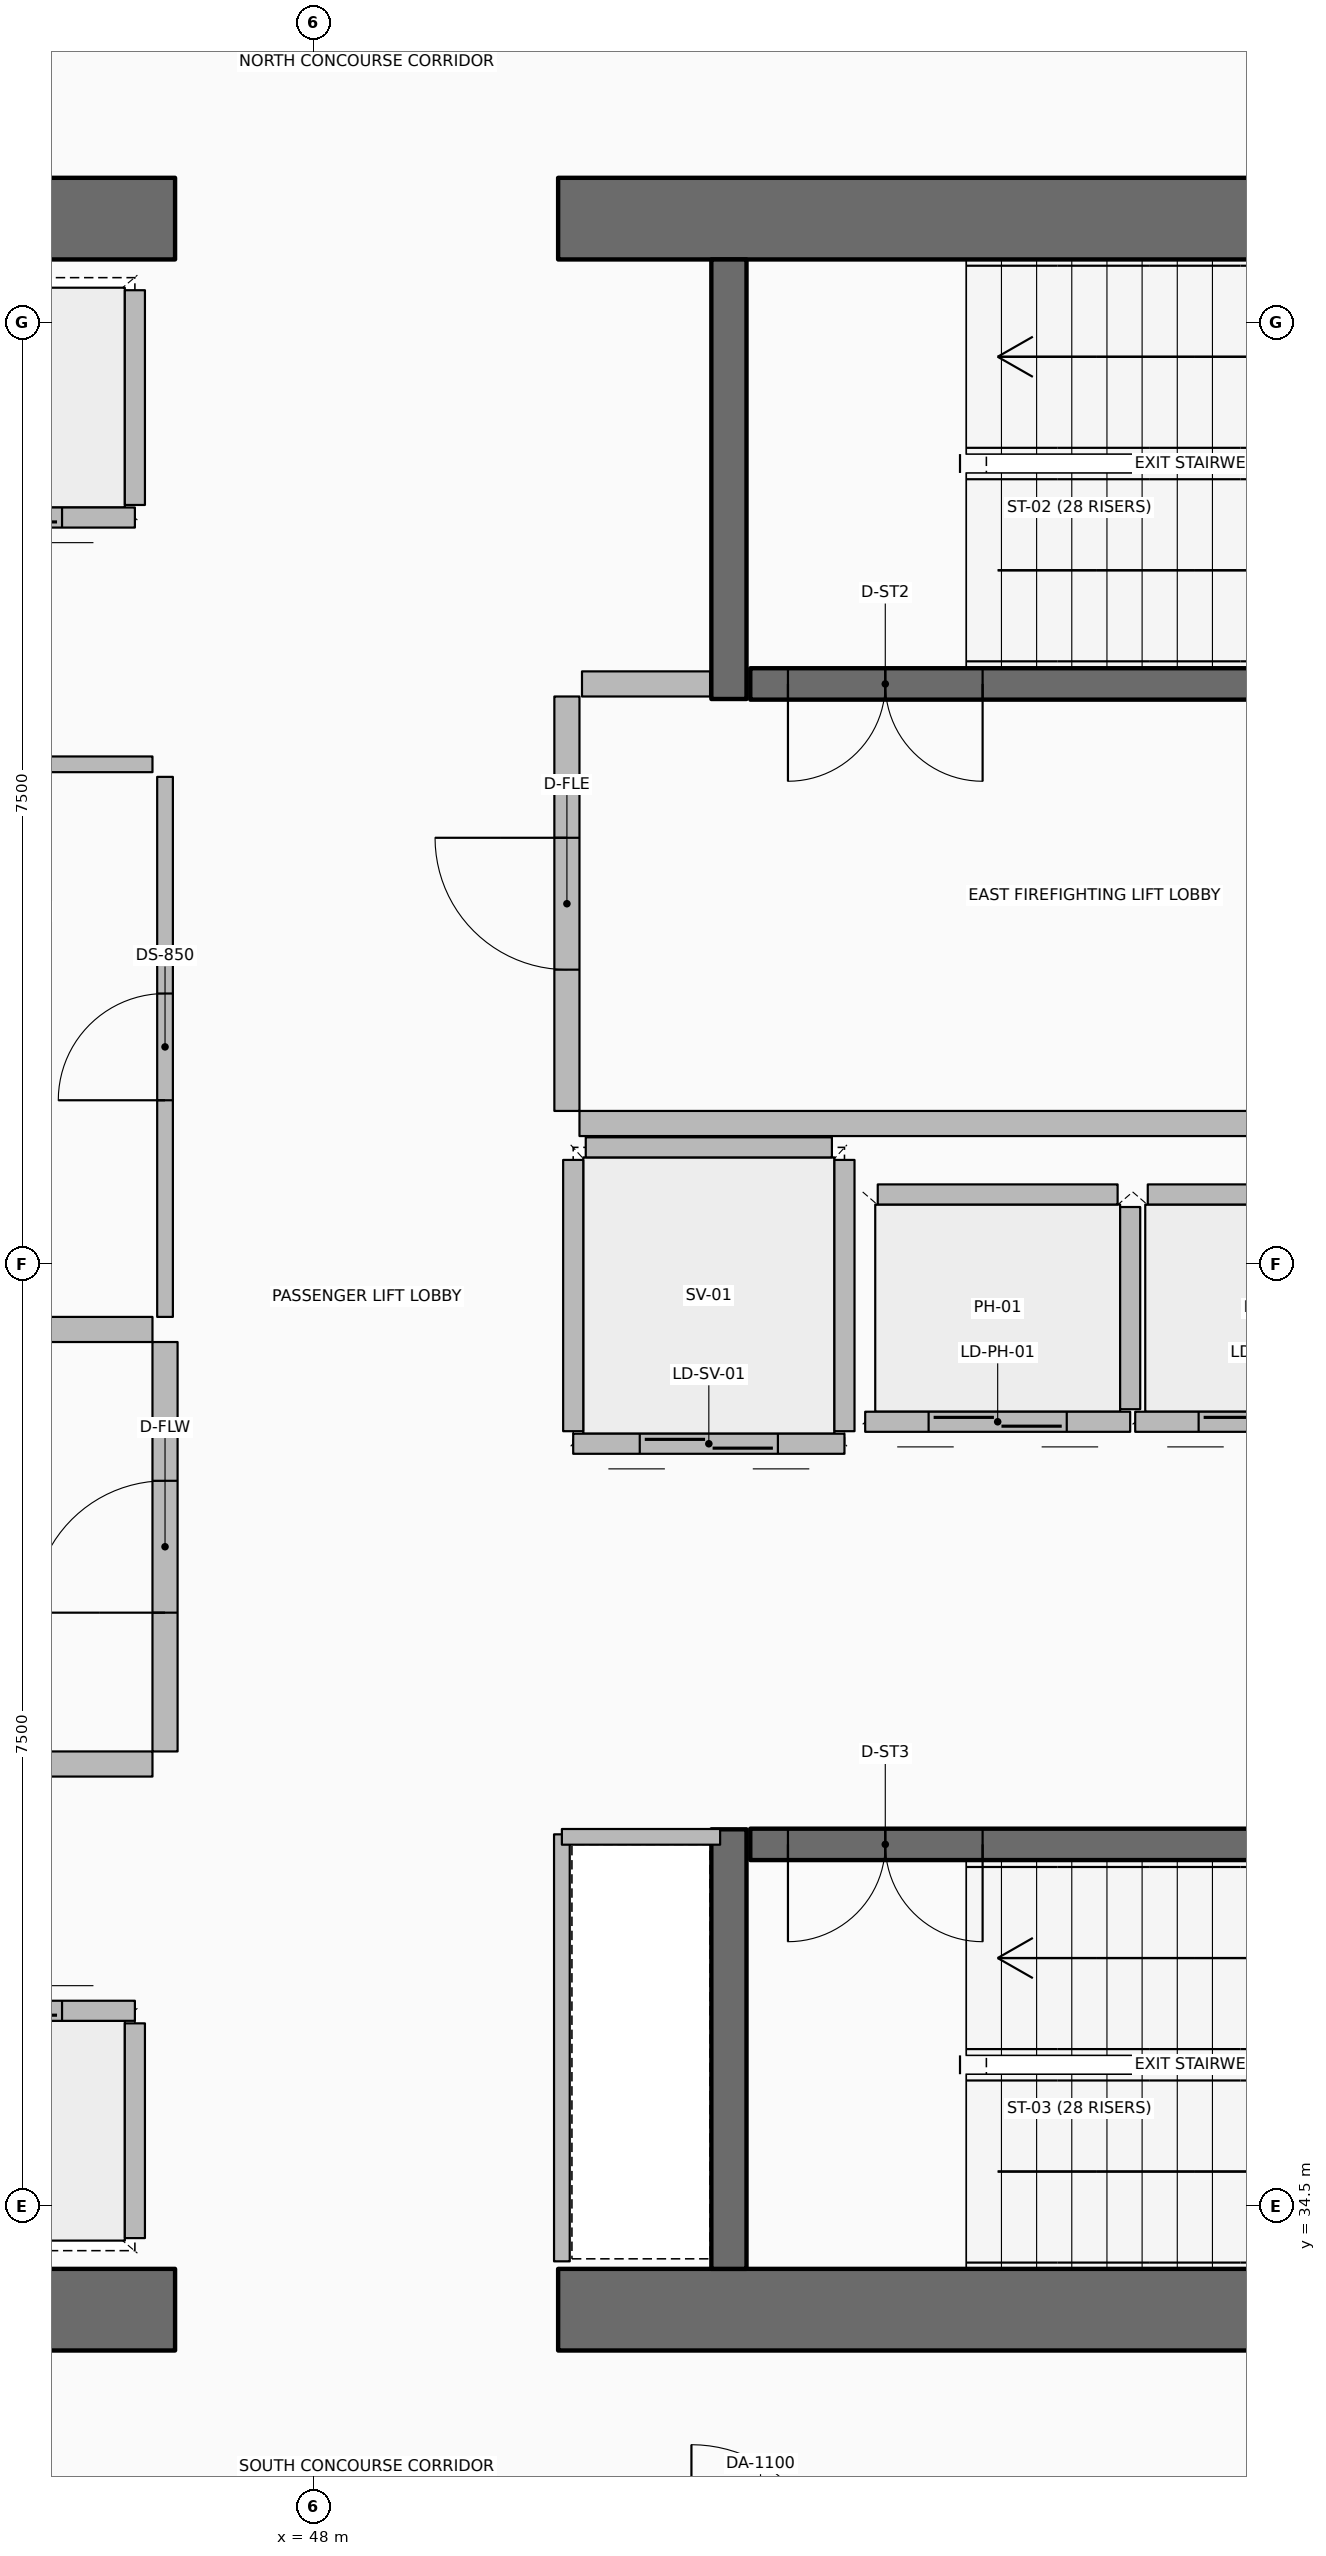
"""IFC4 building model, lengths in metres.
Left out: names, types, materials, properties, quantities, classifications, styles, units other than length and angle.
Written with IfcOpenShell. Run it as: python <this file> out.ifc"""

import sys

from ifc_helpers import new_model, si_unit, direction, frame, frame_2d, origin, place, context, subcontext, project, spatial, rectangle, extrude, element, fill, save


model = new_model("IFC4")
c1 = context("Model", 3, precision=1e-05, world=origin(), true_north=direction((0.0, 1.0)))
c2 = subcontext(c1, "Body", "Model", "MODEL_VIEW")
j1 = project(units=[si_unit("LENGTHUNIT", "METRE"), si_unit("PLANEANGLEUNIT", "RADIAN")], contexts=[c1])
p1 = place(None, origin())
s1 = spatial("IfcSite", under=j1, at=p1, CompositionType="ELEMENT")
p2 = place(p1, origin())
s2 = spatial("IfcBuilding", under=s1, at=p2, CompositionType="ELEMENT")
p3 = place(p2, frame((0.0, 0.0, 231.9)))
s3 = spatial("IfcBuildingStorey", under=s2, at=p3, CompositionType="ELEMENT", Elevation=231.9)
for number, where, z_axis, x_axis in (
    (1, (37.15, 33.675, 0.0), (0.0, 0.0, 1.0), (1.0, 0.0, 0.0)),
    (2, (49.95, 33.675, 0.0), (0.0, 0.0, 1.0), (1.0, 0.0, 0.0)),
    (3, (37.15, 50.325, 0.0), (0.0, 0.0, 1.0), (1.0, 0.0, 0.0)),
    (4, (49.95, 50.325, 0.0), (0.0, 0.0, 1.0), (1.0, 0.0, 0.0)),
):
    element("IfcWall", number, at=place(p3, frame(where, z_axis=z_axis, x_axis=x_axis)), inside=s3, PredefinedType="SHEAR", context=c2, shape_type="SweptSolid", body=[
        extrude(rectangle(XDim=9.75, YDim=0.65, at=frame_2d((4.875, 0.0))), origin(), (0.0, 0.0, 1.0), 4.8),
    ])
for number, where, z_axis, x_axis in (
    (5, (51.31, 46.5, 0.0), (0.0, 0.0, 1.0), (0.0, 1.0, 0.0)),
    (6, (51.31, 34.0, 0.0), (0.0, 0.0, 1.0), (0.0, 1.0, 0.0)),
):
    element("IfcWall", number, at=place(p3, frame(where, z_axis=z_axis, x_axis=x_axis)), inside=s3, PredefinedType="SHEAR", context=c2, shape_type="SweptSolid", body=[
        extrude(rectangle(XDim=3.5, YDim=0.28, at=frame_2d((1.75, 0.0))), origin(), (0.0, 0.0, 1.0), 4.8),
    ])
p4 = place(p3, frame((51.48, 46.62, 0.0), z_axis=(0.0, 0.0, 1.0), x_axis=(1.0, 0.0, 0.0)))
e7 = element("IfcWall", 7, at=p4, inside=s3, PredefinedType="SOLIDWALL", context=c2, shape_type="SweptSolid", body=[
    extrude(rectangle(XDim=7.54, YDim=0.25, at=frame_2d((3.77, 0.0))), origin(), (0.0, 0.0, 1.0), 4.4),
])
p5 = place(p4, frame((0.3, 0.0, 0.0)))
e8 = element("IfcOpeningElement", 8, at=p5, cuts=e7, PredefinedType="OPENING", context=c2, shape_type="SweptSolid", body=[
    extrude(rectangle(XDim=1.55, YDim=2.15, at=frame_2d((0.775, 1.075))), frame((0.0, 0.135, 0.0), z_axis=(0.0, -1.0, 0.0), x_axis=(1.0, 0.0, 0.0)), (0.0, 0.0, 1.0), 0.27),
])
p6 = place(p3, frame((51.48, 37.38, 0.0), z_axis=(0.0, 0.0, 1.0), x_axis=(1.0, 0.0, 0.0)))
e9 = element("IfcWall", 9, at=p6, inside=s3, PredefinedType="SOLIDWALL", context=c2, shape_type="SweptSolid", body=[
    extrude(rectangle(XDim=7.54, YDim=0.25, at=frame_2d((3.77, 0.0))), origin(), (0.0, 0.0, 1.0), 4.4),
])
p7 = place(p6, frame((0.3, 0.0, 0.0)))
e10 = element("IfcOpeningElement", 10, at=p7, cuts=e9, PredefinedType="OPENING", context=c2, shape_type="SweptSolid", body=[
    extrude(rectangle(XDim=1.55, YDim=2.15, at=frame_2d((0.775, 1.075))), frame((0.0, 0.135, 0.0), z_axis=(0.0, -1.0, 0.0), x_axis=(1.0, 0.0, 0.0)), (0.0, 0.0, 1.0), 0.27),
])
p8 = place(p3, frame((46.58, 47.945, 0.0), z_axis=(0.0, 0.0, 1.0), x_axis=(-1.0, 0.0, 0.0)))
e11 = element("IfcWall", 11, at=p8, inside=s3, PredefinedType="PARTITIONING", context=c2, shape_type="SweptSolid", body=[
    extrude(rectangle(XDim=2.26, YDim=0.16, at=frame_2d((1.13, 0.0))), origin(), (0.0, 0.0, 1.0), 4.4),
])
p9 = place(p8, frame((0.58, 0.0, 0.0)))
e12 = element("IfcOpeningElement", 12, at=p9, cuts=e11, PredefinedType="OPENING", context=c2, shape_type="SweptSolid", body=[
    extrude(rectangle(XDim=1.1, YDim=2.1, at=frame_2d((0.55, 1.05))), frame((0.0, 0.09, 0.0), z_axis=(0.0, -1.0, 0.0), x_axis=(1.0, 0.0, 0.0)), (0.0, 0.0, 1.0), 0.18),
])
p10 = place(p3, frame((46.58, 48.045, 0.0), z_axis=(0.0, 0.0, 1.0), x_axis=(0.0, 1.0, 0.0)))
e13 = element("IfcWall", 13, at=p10, inside=s3, PredefinedType="PARTITIONING", context=c2, shape_type="SweptSolid", body=[
    extrude(rectangle(XDim=1.71, YDim=0.16, at=frame_2d((0.855, 0.0))), origin(), (0.0, 0.0, 1.0), 4.4),
])
p11 = place(p3, frame((44.32, 36.055, 0.0), z_axis=(0.0, 0.0, 1.0), x_axis=(1.0, 0.0, 0.0)))
e14 = element("IfcWall", 14, at=p11, inside=s3, PredefinedType="PARTITIONING", context=c2, shape_type="SweptSolid", body=[
    extrude(rectangle(XDim=2.26, YDim=0.16, at=frame_2d((1.13, 0.0))), origin(), (0.0, 0.0, 1.0), 4.4),
])
p12 = place(p11, frame((0.58, 0.0, 0.0)))
e15 = element("IfcOpeningElement", 15, at=p12, cuts=e14, PredefinedType="OPENING", context=c2, shape_type="SweptSolid", body=[
    extrude(rectangle(XDim=1.1, YDim=2.1, at=frame_2d((0.55, 1.05))), frame((0.0, 0.09, 0.0), z_axis=(0.0, -1.0, 0.0), x_axis=(1.0, 0.0, 0.0)), (0.0, 0.0, 1.0), 0.18),
])
p13 = place(p3, frame((46.58, 34.245, 0.0), z_axis=(0.0, 0.0, 1.0), x_axis=(0.0, 1.0, 0.0)))
e16 = element("IfcWall", 16, at=p13, inside=s3, PredefinedType="PARTITIONING", context=c2, shape_type="SweptSolid", body=[
    extrude(rectangle(XDim=1.71, YDim=0.16, at=frame_2d((0.855, 0.0))), origin(), (0.0, 0.0, 1.0), 4.4),
])
p14 = place(p3, frame((54.505, 40.745, 0.0), z_axis=(0.0, 0.0, 1.0), x_axis=(-1.0, 0.0, 0.0)))
e17 = element("IfcWall", 17, at=p14, inside=s3, PredefinedType="PARTITIONING", context=c2, shape_type="SweptSolid", body=[
    extrude(rectangle(XDim=2.11, YDim=0.16, at=frame_2d((1.055, 0.0))), origin(), (0.0, 0.0, 1.0), 4.4),
])
p15 = place(p14, frame((0.505, 0.0, 0.0)))
e18 = element("IfcOpeningElement", 18, at=p15, cuts=e17, PredefinedType="OPENING", context=c2, shape_type="SweptSolid", body=[
    extrude(rectangle(XDim=1.1, YDim=2.1, at=frame_2d((0.55, 1.05))), frame((0.0, 0.09, 0.0), z_axis=(0.0, -1.0, 0.0), x_axis=(1.0, 0.0, 0.0)), (0.0, 0.0, 1.0), 0.18),
])
p16 = place(p3, frame((54.505, 40.845, 0.0), z_axis=(0.0, 0.0, 1.0), x_axis=(0.0, 1.0, 0.0)))
e19 = element("IfcWall", 19, at=p16, inside=s3, PredefinedType="PARTITIONING", context=c2, shape_type="SweptSolid", body=[
    extrude(rectangle(XDim=1.61, YDim=0.16, at=frame_2d((0.805, 0.0))), origin(), (0.0, 0.0, 1.0), 4.4),
])
p17 = place(p3, frame((52.495, 42.555, 0.0), z_axis=(0.0, 0.0, 1.0), x_axis=(1.0, 0.0, 0.0)))
e20 = element("IfcWall", 20, at=p17, inside=s3, PredefinedType="PARTITIONING", context=c2, shape_type="SweptSolid", body=[
    extrude(rectangle(XDim=1.91, YDim=0.16, at=frame_2d((0.955, 0.0))), origin(), (0.0, 0.0, 1.0), 4.4),
])
p18 = place(p3, frame((56.655, 40.745, 0.0), z_axis=(0.0, 0.0, 1.0), x_axis=(-1.0, 0.0, 0.0)))
e21 = element("IfcWall", 21, at=p18, inside=s3, PredefinedType="PARTITIONING", context=c2, shape_type="SweptSolid", body=[
    extrude(rectangle(XDim=2.11, YDim=0.16, at=frame_2d((1.055, 0.0))), origin(), (0.0, 0.0, 1.0), 4.4),
])
p19 = place(p18, frame((0.505, 0.0, 0.0)))
e22 = element("IfcOpeningElement", 22, at=p19, cuts=e21, PredefinedType="OPENING", context=c2, shape_type="SweptSolid", body=[
    extrude(rectangle(XDim=1.1, YDim=2.1, at=frame_2d((0.55, 1.05))), frame((0.0, 0.09, 0.0), z_axis=(0.0, -1.0, 0.0), x_axis=(1.0, 0.0, 0.0)), (0.0, 0.0, 1.0), 0.18),
])
p20 = place(p3, frame((54.645, 42.555, 0.0), z_axis=(0.0, 0.0, 1.0), x_axis=(1.0, 0.0, 0.0)))
e23 = element("IfcWall", 23, at=p20, inside=s3, PredefinedType="PARTITIONING", context=c2, shape_type="SweptSolid", body=[
    extrude(rectangle(XDim=1.91, YDim=0.16, at=frame_2d((0.955, 0.0))), origin(), (0.0, 0.0, 1.0), 4.4),
])
p21 = place(p3, frame((52.23, 40.57, 0.0), z_axis=(0.0, 0.0, 1.0), x_axis=(-1.0, 0.0, 0.0)))
e24 = element("IfcWall", 24, at=p21, inside=s3, PredefinedType="PARTITIONING", context=c2, shape_type="SweptSolid", body=[
    extrude(rectangle(XDim=2.16, YDim=0.16, at=frame_2d((1.08, 0.0))), origin(), (0.0, 0.0, 1.0), 4.4),
])
p22 = place(p21, frame((0.53, 0.0, 0.0)))
e25 = element("IfcOpeningElement", 25, at=p22, cuts=e24, PredefinedType="OPENING", context=c2, shape_type="SweptSolid", body=[
    extrude(rectangle(XDim=1.1, YDim=2.1, at=frame_2d((0.55, 1.05))), frame((0.0, 0.09, 0.0), z_axis=(0.0, -1.0, 0.0), x_axis=(1.0, 0.0, 0.0)), (0.0, 0.0, 1.0), 0.18),
])
for number, where, z_axis, x_axis in (
    (26, (52.23, 40.67, 0.0), (0.0, 0.0, 1.0), (0.0, 1.0, 0.0)),
    (27, (50.07, 40.67, 0.0), (0.0, 0.0, 1.0), (0.0, 1.0, 0.0)),
):
    element("IfcWall", number, at=place(p3, frame(where, z_axis=z_axis, x_axis=x_axis)), inside=s3, PredefinedType="PARTITIONING", context=c2, shape_type="SweptSolid", body=[
        extrude(rectangle(XDim=2.16, YDim=0.16, at=frame_2d((1.08, 0.0))), origin(), (0.0, 0.0, 1.0), 4.4),
    ])
p23 = place(p3, frame((50.17, 42.93, 0.0), z_axis=(0.0, 0.0, 1.0), x_axis=(1.0, 0.0, 0.0)))
e28 = element("IfcWall", 28, at=p23, inside=s3, PredefinedType="PARTITIONING", context=c2, shape_type="SweptSolid", body=[
    extrude(rectangle(XDim=1.96, YDim=0.16, at=frame_2d((0.98, 0.0))), origin(), (0.0, 0.0, 1.0), 4.4),
])
p24 = place(p3, frame((41.35, 38.02, 0.0), z_axis=(0.0, 0.0, 1.0), x_axis=(1.0, 0.0, 0.0)))
e29 = element("IfcWall", 29, at=p24, inside=s3, PredefinedType="PARTITIONING", context=c2, shape_type="SweptSolid", body=[
    extrude(rectangle(XDim=5.37, YDim=0.2, at=frame_2d((2.685, 0.0))), origin(), (0.0, 0.0, 1.0), 4.4),
])
p25 = place(p3, frame((43.92, 41.48, 0.0), z_axis=(0.0, 0.0, 1.0), x_axis=(1.0, 0.0, 0.0)))
e30 = element("IfcWall", 30, at=p25, inside=s3, PredefinedType="PARTITIONING", context=c2, shape_type="SweptSolid", body=[
    extrude(rectangle(XDim=2.8, YDim=0.2, at=frame_2d((1.4, 0.0))), origin(), (0.0, 0.0, 1.0), 4.4),
])
p26 = place(p3, frame((46.82, 38.12, 0.0), z_axis=(0.0, 0.0, 1.0), x_axis=(0.0, 1.0, 0.0)))
e31 = element("IfcWall", 31, at=p26, inside=s3, PredefinedType="PARTITIONING", context=c2, shape_type="SweptSolid", body=[
    extrude(rectangle(XDim=3.26, YDim=0.2, at=frame_2d((1.63, 0.0))), origin(), (0.0, 0.0, 1.0), 4.4),
])
p27 = place(p26, frame((1.105, 0.0, 0.0)))
e32 = element("IfcOpeningElement", 32, at=p27, cuts=e31, PredefinedType="OPENING", context=c2, shape_type="SweptSolid", body=[
    extrude(rectangle(XDim=1.05, YDim=2.1, at=frame_2d((0.525, 1.05))), frame((0.0, 0.11, 0.0), z_axis=(0.0, -1.0, 0.0), x_axis=(1.0, 0.0, 0.0)), (0.0, 0.0, 1.0), 0.22),
])
p28 = place(p3, frame((50.12, 43.12, 0.0), z_axis=(0.0, 0.0, 1.0), x_axis=(1.0, 0.0, 0.0)))
e33 = element("IfcWall", 33, at=p28, inside=s3, PredefinedType="PARTITIONING", context=c2, shape_type="SweptSolid", body=[
    extrude(rectangle(XDim=8.88, YDim=0.2, at=frame_2d((4.44, 0.0))), origin(), (0.0, 0.0, 1.0), 4.4),
])
p29 = place(p3, frame((50.14, 46.62, 0.0), z_axis=(0.0, 0.0, 1.0), x_axis=(1.0, 0.0, 0.0)))
e34 = element("IfcWall", 34, at=p29, inside=s3, PredefinedType="PARTITIONING", context=c2, shape_type="SweptSolid", body=[
    extrude(rectangle(XDim=1.02, YDim=0.2, at=frame_2d((0.51, 0.0))), origin(), (0.0, 0.0, 1.0), 4.4),
])
p30 = place(p3, frame((50.02, 43.22, 0.0), z_axis=(0.0, 0.0, 1.0), x_axis=(0.0, 1.0, 0.0)))
e35 = element("IfcWall", 35, at=p30, inside=s3, PredefinedType="PARTITIONING", context=c2, shape_type="SweptSolid", body=[
    extrude(rectangle(XDim=3.3, YDim=0.2, at=frame_2d((1.65, 0.0))), origin(), (0.0, 0.0, 1.0), 4.4),
])
p31 = place(p30, frame((1.125, 0.0, 0.0)))
e36 = element("IfcOpeningElement", 36, at=p31, cuts=e35, PredefinedType="OPENING", context=c2, shape_type="SweptSolid", body=[
    extrude(rectangle(XDim=1.05, YDim=2.1, at=frame_2d((0.525, 1.05))), frame((0.0, 0.11, 0.0), z_axis=(0.0, -1.0, 0.0), x_axis=(1.0, 0.0, 0.0)), (0.0, 0.0, 1.0), 0.22),
])
p32 = place(p3, frame((41.36, 45.98, 0.0), z_axis=(0.0, 0.0, 1.0), x_axis=(1.0, 0.0, 0.0)))
e37 = element("IfcWall", 37, at=p32, inside=s3, PredefinedType="PARTITIONING", context=c2, shape_type="SweptSolid", body=[
    extrude(rectangle(XDim=5.36, YDim=0.125, at=frame_2d((2.68, 0.0))), origin(), (0.0, 0.0, 1.0), 3.84),
])
p33 = place(p3, frame((49.98, 34.06, 0.0), z_axis=(0.0, 0.0, 1.0), x_axis=(0.0, 1.0, 0.0)))
e38 = element("IfcWall", 38, at=p33, inside=s3, PredefinedType="PARTITIONING", context=c2, shape_type="SweptSolid", body=[
    extrude(rectangle(XDim=3.4, YDim=0.125, at=frame_2d((1.7, 0.0))), origin(), (0.0, 0.0, 1.0), 3.84),
])
p34 = place(p3, frame((49.98, 37.44, 0.0), z_axis=(0.0, 0.0, 1.0), x_axis=(1.0, 0.0, 0.0)))
e39 = element("IfcWall", 39, at=p34, inside=s3, PredefinedType="PARTITIONING", context=c2, shape_type="SweptSolid", body=[
    extrude(rectangle(XDim=1.26, YDim=0.125, at=frame_2d((0.63, 0.0))), origin(), (0.0, 0.0, 1.0), 3.84),
])
p35 = place(p3, frame((46.82, 41.58, 0.0), z_axis=(0.0, 0.0, 1.0), x_axis=(0.0, 1.0, 0.0)))
e40 = element("IfcWall", 40, at=p35, inside=s3, PredefinedType="PARTITIONING", context=c2, shape_type="SweptSolid", body=[
    extrude(rectangle(XDim=4.3, YDim=0.125, at=frame_2d((2.15, 0.0))), origin(), (0.0, 0.0, 1.0), 3.84),
])
p36 = place(p35, frame((1.725, 0.0, 0.0)))
e41 = element("IfcOpeningElement", 41, at=p36, cuts=e40, PredefinedType="OPENING", context=c2, shape_type="SweptSolid", body=[
    extrude(rectangle(XDim=0.85, YDim=2.06, at=frame_2d((0.425, 1.03))), frame((0.0, 0.073, 0.0), z_axis=(0.0, -1.0, 0.0), x_axis=(1.0, 0.0, 0.0)), (0.0, 0.0, 1.0), 0.145),
])
p37 = place(p5, origin())
e42 = element("IfcDoor", 42, at=p37, inside=s3, OperationType="DOUBLE_DOOR_SINGLE_SWING", PredefinedType="DOOR", context=c2, shape_type="SweptSolid", body=[
    extrude(rectangle(XDim=1.55, YDim=2.15, at=frame_2d((0.775, 1.075))), frame((0.0, 0.025, 0.0), z_axis=(0.0, -1.0, 0.0), x_axis=(1.0, 0.0, 0.0)), (0.0, 0.0, 1.0), 0.05),
])
fill(e8, e42)
p38 = place(p7, origin())
e43 = element("IfcDoor", 43, at=p38, inside=s3, OperationType="DOUBLE_DOOR_SINGLE_SWING", PredefinedType="DOOR", context=c2, shape_type="SweptSolid", body=[
    extrude(rectangle(XDim=1.55, YDim=2.15, at=frame_2d((0.775, 1.075))), frame((0.0, 0.025, 0.0), z_axis=(0.0, -1.0, 0.0), x_axis=(1.0, 0.0, 0.0)), (0.0, 0.0, 1.0), 0.05),
])
fill(e10, e43)
p39 = place(p9, origin())
e44 = element("IfcDoor", 44, at=p39, inside=s3, OperationType="DOUBLE_DOOR_SLIDING", PredefinedType="DOOR", context=c2, shape_type="SweptSolid", body=[
    extrude(rectangle(XDim=1.1, YDim=2.1, at=frame_2d((0.55, 1.05))), frame((0.0, 0.025, 0.0), z_axis=(0.0, -1.0, 0.0), x_axis=(1.0, 0.0, 0.0)), (0.0, 0.0, 1.0), 0.05),
])
fill(e12, e44)
p40 = place(p12, origin())
e45 = element("IfcDoor", 45, at=p40, inside=s3, OperationType="DOUBLE_DOOR_SLIDING", PredefinedType="DOOR", context=c2, shape_type="SweptSolid", body=[
    extrude(rectangle(XDim=1.1, YDim=2.1, at=frame_2d((0.55, 1.05))), frame((0.0, 0.025, 0.0), z_axis=(0.0, -1.0, 0.0), x_axis=(1.0, 0.0, 0.0)), (0.0, 0.0, 1.0), 0.05),
])
fill(e15, e45)
p41 = place(p15, origin())
e46 = element("IfcDoor", 46, at=p41, inside=s3, OperationType="DOUBLE_DOOR_SLIDING", PredefinedType="DOOR", context=c2, shape_type="SweptSolid", body=[
    extrude(rectangle(XDim=1.1, YDim=2.1, at=frame_2d((0.55, 1.05))), frame((0.0, 0.025, 0.0), z_axis=(0.0, -1.0, 0.0), x_axis=(1.0, 0.0, 0.0)), (0.0, 0.0, 1.0), 0.05),
])
fill(e18, e46)
p42 = place(p19, origin())
e47 = element("IfcDoor", 47, at=p42, inside=s3, OperationType="DOUBLE_DOOR_SLIDING", PredefinedType="DOOR", context=c2, shape_type="SweptSolid", body=[
    extrude(rectangle(XDim=1.1, YDim=2.1, at=frame_2d((0.55, 1.05))), frame((0.0, 0.025, 0.0), z_axis=(0.0, -1.0, 0.0), x_axis=(1.0, 0.0, 0.0)), (0.0, 0.0, 1.0), 0.05),
])
fill(e22, e47)
p43 = place(p22, origin())
e48 = element("IfcDoor", 48, at=p43, inside=s3, OperationType="DOUBLE_DOOR_SLIDING", PredefinedType="DOOR", context=c2, shape_type="SweptSolid", body=[
    extrude(rectangle(XDim=1.1, YDim=2.1, at=frame_2d((0.55, 1.05))), frame((0.0, 0.025, 0.0), z_axis=(0.0, -1.0, 0.0), x_axis=(1.0, 0.0, 0.0)), (0.0, 0.0, 1.0), 0.05),
])
fill(e25, e48)
p44 = place(p27, origin())
e49 = element("IfcDoor", 49, at=p44, inside=s3, OperationType="SINGLE_SWING_LEFT", PredefinedType="DOOR", context=c2, shape_type="SweptSolid", body=[
    extrude(rectangle(XDim=1.05, YDim=2.1, at=frame_2d((0.525, 1.05))), frame((0.0, 0.025, 0.0), z_axis=(0.0, -1.0, 0.0), x_axis=(1.0, 0.0, 0.0)), (0.0, 0.0, 1.0), 0.05),
])
fill(e32, e49)
p45 = place(p31, origin())
e50 = element("IfcDoor", 50, at=p45, inside=s3, OperationType="SINGLE_SWING_RIGHT", PredefinedType="DOOR", context=c2, shape_type="SweptSolid", body=[
    extrude(rectangle(XDim=1.05, YDim=2.1, at=frame_2d((0.525, 1.05))), frame((0.0, 0.025, 0.0), z_axis=(0.0, -1.0, 0.0), x_axis=(1.0, 0.0, 0.0)), (0.0, 0.0, 1.0), 0.05),
])
fill(e36, e50)
p46 = place(p36, origin())
e51 = element("IfcDoor", 51, at=p46, inside=s3, OperationType="SINGLE_SWING_LEFT", PredefinedType="DOOR", context=c2, shape_type="SweptSolid", body=[
    extrude(rectangle(XDim=0.85, YDim=2.06, at=frame_2d((0.425, 1.03))), frame((0.0, 0.025, 0.0), z_axis=(0.0, -1.0, 0.0), x_axis=(1.0, 0.0, 0.0)), (0.0, 0.0, 1.0), 0.05),
])
fill(e41, e51)
save(model, sys.argv[1])
